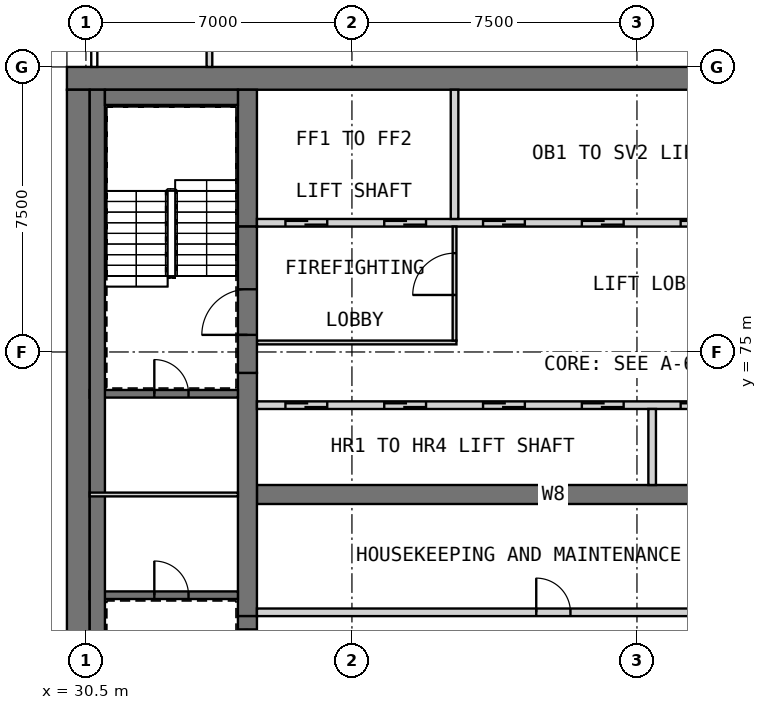
"""IFC4 building model, lengths in metres.
Left out: names, types, materials, properties, quantities, classifications, styles, units other than length and angle.
Written with IfcOpenShell. Run it as: python <this file> out.ifc"""

import sys

from ifc_helpers import new_model, si_unit, direction, frame, frame_2d, origin, place, context, subcontext, project, spatial, rectangle, extrude, element, fill, save


model = new_model("IFC4")
c1 = context("Model", 3, precision=1e-05, world=origin(), true_north=direction((0.0, 1.0)))
c2 = subcontext(c1, "Body", "Model", "MODEL_VIEW")
j1 = project(units=[si_unit("LENGTHUNIT", "METRE"), si_unit("PLANEANGLEUNIT", "RADIAN")], contexts=[c1])
p1 = place(None, origin())
s1 = spatial("IfcSite", under=j1, at=p1, CompositionType="ELEMENT")
p2 = place(p1, origin())
s2 = spatial("IfcBuilding", under=s1, at=p2, CompositionType="ELEMENT")
p3 = place(p2, frame((0.0, 0.0, 302.7)))
s3 = spatial("IfcBuildingStorey", under=s2, at=p3, CompositionType="ELEMENT", Elevation=302.7)
p4 = place(p3, frame((30.0, 82.2, 0.0), z_axis=(0.0, 0.0, 1.0), x_axis=(1.0, 0.0, 0.0)))
e1 = element("IfcWall", 1, at=p4, inside=s3, PredefinedType="SHEAR", context=c2, shape_type="SweptSolid", body=[
    extrude(rectangle(XDim=30.0, YDim=0.6, at=frame_2d((15.0, 0.0))), origin(), (0.0, 0.0, 1.0), 6.0),
])
p5 = place(p3, frame((30.3, 60.6, 0.0), z_axis=(0.0, 0.0, 1.0), x_axis=(0.0, 1.0, 0.0)))
e2 = element("IfcWall", 2, at=p5, inside=s3, PredefinedType="SHEAR", context=c2, shape_type="SweptSolid", body=[
    extrude(rectangle(XDim=21.3, YDim=0.6, at=frame_2d((10.65, 0.0))), origin(), (0.0, 0.0, 1.0), 6.0),
])
p6 = place(p3, frame((35.0, 71.25, 0.0), z_axis=(0.0, 0.0, 1.0), x_axis=(1.0, 0.0, 0.0)))
e3 = element("IfcWall", 3, at=p6, inside=s3, PredefinedType="SHEAR", context=c2, shape_type="SweptSolid", body=[
    extrude(rectangle(XDim=15.6, YDim=0.5, at=frame_2d((7.8, 0.0))), origin(), (0.0, 0.0, 1.0), 6.0),
])
p7 = place(p3, frame((34.75, 68.05, 0.0), z_axis=(0.0, 0.0, 1.0), x_axis=(0.0, 1.0, 0.0)))
e4 = element("IfcWall", 4, at=p7, inside=s3, PredefinedType="SHEAR", context=c2, shape_type="SweptSolid", body=[
    extrude(rectangle(XDim=6.4, YDim=0.5, at=frame_2d((3.2, 0.0))), origin(), (0.0, 0.0, 1.0), 6.0),
])
p8 = place(p3, frame((34.75, 78.3, 0.0), z_axis=(0.0, 0.0, 1.0), x_axis=(0.0, 1.0, 0.0)))
e5 = element("IfcWall", 5, at=p8, inside=s3, PredefinedType="SHEAR", context=c2, shape_type="SweptSolid", body=[
    extrude(rectangle(XDim=3.6, YDim=0.5, at=frame_2d((1.8, 0.0))), origin(), (0.0, 0.0, 1.0), 6.0),
])
p9 = place(p2, frame((0.0, 0.0, 34.0)))
s4 = spatial("IfcBuildingStorey", under=s2, at=p9, CompositionType="ELEMENT", Elevation=34.0)
for number, where, z_axis, x_axis in (
    (6, (29.7, 70.8, 0.0), (0.0, 0.0, 1.0), (0.0, 1.0, 0.0)),
    (7, (29.7, 75.675, 0.0), (0.0, 0.0, 1.0), (0.0, 1.0, 0.0)),
    (8, (29.7, 80.55, 0.0), (0.0, 0.0, 1.0), (0.0, 1.0, 0.0)),
):
    element("IfcWall", number, at=place(p9, frame(where, z_axis=z_axis, x_axis=x_axis)), inside=s4, PredefinedType="SOLIDWALL", context=c2, shape_type="SweptSolid", body=[
        extrude(rectangle(XDim=0.9, YDim=0.6, at=frame_2d((0.45, 0.0))), origin(), (0.0, 0.0, 1.0), 286.2),
    ])
p10 = place(p3, frame((35.0, 68.15, 0.0), z_axis=(0.0, 0.0, 1.0), x_axis=(1.0, 0.0, 0.0)))
e9 = element("IfcWall", 9, at=p10, inside=s3, PredefinedType="PARTITIONING", context=c2, shape_type="SweptSolid", body=[
    extrude(rectangle(XDim=15.6, YDim=0.2, at=frame_2d((7.8, 0.0))), origin(), (0.0, 0.0, 1.0), 5.7),
])
p11 = place(p10, frame((7.35, 0.0, 0.0)))
e10 = element("IfcOpeningElement", 10, at=p11, cuts=e9, PredefinedType="OPENING", context=c2, shape_type="SweptSolid", body=[
    extrude(rectangle(XDim=0.9, YDim=2.1, at=frame_2d((0.45, 1.05))), frame((0.0, 0.11, 0.0), z_axis=(0.0, -1.0, 0.0), x_axis=(1.0, 0.0, 0.0)), (0.0, 0.0, 1.0), 0.22),
])
p12 = place(p3, frame((35.0, 73.6, 0.0), z_axis=(0.0, 0.0, 1.0), x_axis=(1.0, 0.0, 0.0)))
e11 = element("IfcWall", 11, at=p12, inside=s3, PredefinedType="SOLIDWALL", context=c2, shape_type="SweptSolid", body=[
    extrude(rectangle(XDim=15.6, YDim=0.2, at=frame_2d((7.8, 0.0))), origin(), (0.0, 0.0, 1.0), 6.0),
])
p13 = place(p12, frame((0.75, 0.0, 0.0)))
e12 = element("IfcOpeningElement", 12, at=p13, cuts=e11, PredefinedType="OPENING", context=c2, shape_type="SweptSolid", body=[
    extrude(rectangle(XDim=1.1, YDim=2.1, at=frame_2d((0.55, 1.05))), frame((0.0, 0.11, 0.0), z_axis=(0.0, -1.0, 0.0), x_axis=(1.0, 0.0, 0.0)), (0.0, 0.0, 1.0), 0.22),
])
p14 = place(p12, frame((3.35, 0.0, 0.0)))
e13 = element("IfcOpeningElement", 13, at=p14, cuts=e11, PredefinedType="OPENING", context=c2, shape_type="SweptSolid", body=[
    extrude(rectangle(XDim=1.1, YDim=2.1, at=frame_2d((0.55, 1.05))), frame((0.0, 0.11, 0.0), z_axis=(0.0, -1.0, 0.0), x_axis=(1.0, 0.0, 0.0)), (0.0, 0.0, 1.0), 0.22),
])
p15 = place(p12, frame((5.95, 0.0, 0.0)))
e14 = element("IfcOpeningElement", 14, at=p15, cuts=e11, PredefinedType="OPENING", context=c2, shape_type="SweptSolid", body=[
    extrude(rectangle(XDim=1.1, YDim=2.1, at=frame_2d((0.55, 1.05))), frame((0.0, 0.11, 0.0), z_axis=(0.0, -1.0, 0.0), x_axis=(1.0, 0.0, 0.0)), (0.0, 0.0, 1.0), 0.22),
])
p16 = place(p12, frame((8.55, 0.0, 0.0)))
e15 = element("IfcOpeningElement", 15, at=p16, cuts=e11, PredefinedType="OPENING", context=c2, shape_type="SweptSolid", body=[
    extrude(rectangle(XDim=1.1, YDim=2.1, at=frame_2d((0.55, 1.05))), frame((0.0, 0.11, 0.0), z_axis=(0.0, -1.0, 0.0), x_axis=(1.0, 0.0, 0.0)), (0.0, 0.0, 1.0), 0.22),
])
p17 = place(p12, frame((11.15, 0.0, 0.0)))
e16 = element("IfcOpeningElement", 16, at=p17, cuts=e11, PredefinedType="OPENING", context=c2, shape_type="SweptSolid", body=[
    extrude(rectangle(XDim=1.1, YDim=2.1, at=frame_2d((0.55, 1.05))), frame((0.0, 0.11, 0.0), z_axis=(0.0, -1.0, 0.0), x_axis=(1.0, 0.0, 0.0)), (0.0, 0.0, 1.0), 0.22),
])
p18 = place(p12, frame((13.75, 0.0, 0.0)))
e17 = element("IfcOpeningElement", 17, at=p18, cuts=e11, PredefinedType="OPENING", context=c2, shape_type="SweptSolid", body=[
    extrude(rectangle(XDim=1.1, YDim=2.1, at=frame_2d((0.55, 1.05))), frame((0.0, 0.11, 0.0), z_axis=(0.0, -1.0, 0.0), x_axis=(1.0, 0.0, 0.0)), (0.0, 0.0, 1.0), 0.22),
])
p19 = place(p3, frame((45.4, 71.5, 0.0), z_axis=(0.0, 0.0, 1.0), x_axis=(0.0, 1.0, 0.0)))
e18 = element("IfcWall", 18, at=p19, inside=s3, PredefinedType="SOLIDWALL", context=c2, shape_type="SweptSolid", body=[
    extrude(rectangle(XDim=2.0, YDim=0.2, at=frame_2d((1.0, 0.0))), origin(), (0.0, 0.0, 1.0), 6.0),
])
p20 = place(p3, frame((35.0, 78.4, 0.0), z_axis=(0.0, 0.0, 1.0), x_axis=(1.0, 0.0, 0.0)))
e19 = element("IfcWall", 19, at=p20, inside=s3, PredefinedType="SOLIDWALL", context=c2, shape_type="SweptSolid", body=[
    extrude(rectangle(XDim=15.6, YDim=0.2, at=frame_2d((7.8, 0.0))), origin(), (0.0, 0.0, 1.0), 6.0),
])
p21 = place(p20, frame((0.75, 0.0, 0.0)))
e20 = element("IfcOpeningElement", 20, at=p21, cuts=e19, PredefinedType="OPENING", context=c2, shape_type="SweptSolid", body=[
    extrude(rectangle(XDim=1.1, YDim=2.1, at=frame_2d((0.55, 1.05))), frame((0.0, 0.11, 0.0), z_axis=(0.0, -1.0, 0.0), x_axis=(1.0, 0.0, 0.0)), (0.0, 0.0, 1.0), 0.22),
])
p22 = place(p20, frame((3.35, 0.0, 0.0)))
e21 = element("IfcOpeningElement", 21, at=p22, cuts=e19, PredefinedType="OPENING", context=c2, shape_type="SweptSolid", body=[
    extrude(rectangle(XDim=1.1, YDim=2.1, at=frame_2d((0.55, 1.05))), frame((0.0, 0.11, 0.0), z_axis=(0.0, -1.0, 0.0), x_axis=(1.0, 0.0, 0.0)), (0.0, 0.0, 1.0), 0.22),
])
p23 = place(p20, frame((5.95, 0.0, 0.0)))
e22 = element("IfcOpeningElement", 22, at=p23, cuts=e19, PredefinedType="OPENING", context=c2, shape_type="SweptSolid", body=[
    extrude(rectangle(XDim=1.1, YDim=2.1, at=frame_2d((0.55, 1.05))), frame((0.0, 0.11, 0.0), z_axis=(0.0, -1.0, 0.0), x_axis=(1.0, 0.0, 0.0)), (0.0, 0.0, 1.0), 0.22),
])
p24 = place(p20, frame((8.55, 0.0, 0.0)))
e23 = element("IfcOpeningElement", 23, at=p24, cuts=e19, PredefinedType="OPENING", context=c2, shape_type="SweptSolid", body=[
    extrude(rectangle(XDim=1.1, YDim=2.1, at=frame_2d((0.55, 1.05))), frame((0.0, 0.11, 0.0), z_axis=(0.0, -1.0, 0.0), x_axis=(1.0, 0.0, 0.0)), (0.0, 0.0, 1.0), 0.22),
])
p25 = place(p20, frame((11.15, 0.0, 0.0)))
e24 = element("IfcOpeningElement", 24, at=p25, cuts=e19, PredefinedType="OPENING", context=c2, shape_type="SweptSolid", body=[
    extrude(rectangle(XDim=1.1, YDim=2.1, at=frame_2d((0.55, 1.05))), frame((0.0, 0.11, 0.0), z_axis=(0.0, -1.0, 0.0), x_axis=(1.0, 0.0, 0.0)), (0.0, 0.0, 1.0), 0.22),
])
p26 = place(p20, frame((13.75, 0.0, 0.0)))
e25 = element("IfcOpeningElement", 25, at=p26, cuts=e19, PredefinedType="OPENING", context=c2, shape_type="SweptSolid", body=[
    extrude(rectangle(XDim=1.1, YDim=2.1, at=frame_2d((0.55, 1.05))), frame((0.0, 0.11, 0.0), z_axis=(0.0, -1.0, 0.0), x_axis=(1.0, 0.0, 0.0)), (0.0, 0.0, 1.0), 0.22),
])
p27 = place(p3, frame((40.2, 78.5, 0.0), z_axis=(0.0, 0.0, 1.0), x_axis=(0.0, 1.0, 0.0)))
e26 = element("IfcWall", 26, at=p27, inside=s3, PredefinedType="SOLIDWALL", context=c2, shape_type="SweptSolid", body=[
    extrude(rectangle(XDim=3.4, YDim=0.2, at=frame_2d((1.7, 0.0))), origin(), (0.0, 0.0, 1.0), 6.0),
])
p28 = place(p3, frame((35.0, 75.25, 0.0), z_axis=(0.0, 0.0, 1.0), x_axis=(1.0, 0.0, 0.0)))
e27 = element("IfcWall", 27, at=p28, inside=s3, PredefinedType="PARTITIONING", context=c2, shape_type="SweptSolid", body=[
    extrude(rectangle(XDim=5.25, YDim=0.1, at=frame_2d((2.625, 0.0))), origin(), (0.0, 0.0, 1.0), 5.7),
])
p29 = place(p3, frame((40.2, 75.3, 0.0), z_axis=(0.0, 0.0, 1.0), x_axis=(0.0, 1.0, 0.0)))
e28 = element("IfcWall", 28, at=p29, inside=s3, PredefinedType="PARTITIONING", context=c2, shape_type="SweptSolid", body=[
    extrude(rectangle(XDim=3.0, YDim=0.1, at=frame_2d((1.5, 0.0))), origin(), (0.0, 0.0, 1.0), 5.7),
])
p30 = place(p29, frame((1.2, 0.0, 0.0)))
e29 = element("IfcOpeningElement", 29, at=p30, cuts=e28, PredefinedType="OPENING", context=c2, shape_type="SweptSolid", body=[
    extrude(rectangle(XDim=1.1, YDim=2.1, at=frame_2d((0.55, 1.05))), frame((0.0, 0.06, 0.0), z_axis=(0.0, -1.0, 0.0), x_axis=(1.0, 0.0, 0.0)), (0.0, 0.0, 1.0), 0.12),
])
p31 = place(p3, frame((34.75, 64.2, 0.0), z_axis=(0.0, 0.0, 1.0), x_axis=(0.0, 1.0, 0.0)))
e30 = element("IfcWall", 30, at=p31, inside=s3, PredefinedType="SOLIDWALL", context=c2, shape_type="SweptSolid", body=[
    extrude(rectangle(XDim=3.85, YDim=0.5, at=frame_2d((1.925, 0.0))), origin(), (0.0, 0.0, 1.0), 4.8),
])
p32 = place(p31, frame((2.3, 0.0, 0.0)))
e31 = element("IfcOpeningElement", 31, at=p32, cuts=e30, PredefinedType="OPENING", context=c2, shape_type="SweptSolid", body=[
    extrude(rectangle(XDim=1.2, YDim=2.1, at=frame_2d((0.6, 1.05))), frame((0.0, 0.26, 0.0), z_axis=(0.0, -1.0, 0.0), x_axis=(1.0, 0.0, 0.0)), (0.0, 0.0, 1.0), 0.52),
])
p33 = place(p3, frame((34.75, 74.45, 0.0), z_axis=(0.0, 0.0, 1.0), x_axis=(0.0, 1.0, 0.0)))
e32 = element("IfcWall", 32, at=p33, inside=s3, PredefinedType="SOLIDWALL", context=c2, shape_type="SweptSolid", body=[
    extrude(rectangle(XDim=3.85, YDim=0.5, at=frame_2d((1.925, 0.0))), origin(), (0.0, 0.0, 1.0), 4.8),
])
p34 = place(p33, frame((1.0, 0.0, 0.0)))
e33 = element("IfcOpeningElement", 33, at=p34, cuts=e32, PredefinedType="OPENING", context=c2, shape_type="SweptSolid", body=[
    extrude(rectangle(XDim=1.2, YDim=2.1, at=frame_2d((0.6, 1.05))), frame((0.0, 0.26, 0.0), z_axis=(0.0, -1.0, 0.0), x_axis=(1.0, 0.0, 0.0)), (0.0, 0.0, 1.0), 0.52),
])
p35 = place(p3, frame((30.6, 68.6, 0.0), z_axis=(0.0, 0.0, 1.0), x_axis=(1.0, 0.0, 0.0)))
e34 = element("IfcWall", 34, at=p35, inside=s3, PredefinedType="SOLIDWALL", context=c2, shape_type="SweptSolid", body=[
    extrude(rectangle(XDim=3.9, YDim=0.2, at=frame_2d((1.95, 0.0))), origin(), (0.0, 0.0, 1.0), 5.7),
])
p36 = place(p35, frame((1.7, 0.0, 0.0)))
e35 = element("IfcOpeningElement", 35, at=p36, cuts=e34, PredefinedType="OPENING", context=c2, shape_type="SweptSolid", body=[
    extrude(rectangle(XDim=0.9, YDim=2.1, at=frame_2d((0.45, 1.05))), frame((0.0, 0.11, 0.0), z_axis=(0.0, -1.0, 0.0), x_axis=(1.0, 0.0, 0.0)), (0.0, 0.0, 1.0), 0.22),
])
p37 = place(p3, frame((30.6, 73.9, 0.0), z_axis=(0.0, 0.0, 1.0), x_axis=(1.0, 0.0, 0.0)))
e36 = element("IfcWall", 36, at=p37, inside=s3, PredefinedType="SOLIDWALL", context=c2, shape_type="SweptSolid", body=[
    extrude(rectangle(XDim=3.9, YDim=0.2, at=frame_2d((1.95, 0.0))), origin(), (0.0, 0.0, 1.0), 5.7),
])
p38 = place(p37, frame((1.7, 0.0, 0.0)))
e37 = element("IfcOpeningElement", 37, at=p38, cuts=e36, PredefinedType="OPENING", context=c2, shape_type="SweptSolid", body=[
    extrude(rectangle(XDim=0.9, YDim=2.1, at=frame_2d((0.45, 1.05))), frame((0.0, 0.11, 0.0), z_axis=(0.0, -1.0, 0.0), x_axis=(1.0, 0.0, 0.0)), (0.0, 0.0, 1.0), 0.22),
])
p39 = place(p3, frame((30.8, 60.6, 0.0), z_axis=(0.0, 0.0, 1.0), x_axis=(0.0, 1.0, 0.0)))
e38 = element("IfcWall", 38, at=p39, inside=s3, PredefinedType="SOLIDWALL", context=c2, shape_type="SweptSolid", body=[
    extrude(rectangle(XDim=21.3, YDim=0.4, at=frame_2d((10.65, 0.0))), origin(), (0.0, 0.0, 1.0), 5.7),
])
p40 = place(p3, frame((31.0, 81.7, 0.0), z_axis=(0.0, 0.0, 1.0), x_axis=(1.0, 0.0, 0.0)))
e39 = element("IfcWall", 39, at=p40, inside=s3, PredefinedType="SOLIDWALL", context=c2, shape_type="SweptSolid", body=[
    extrude(rectangle(XDim=3.5, YDim=0.4, at=frame_2d((1.75, 0.0))), origin(), (0.0, 0.0, 1.0), 5.7),
])
p41 = place(p3, frame((30.6, 71.25, 0.0), z_axis=(0.0, 0.0, 1.0), x_axis=(1.0, 0.0, 0.0)))
e40 = element("IfcWall", 40, at=p41, inside=s3, PredefinedType="PARTITIONING", context=c2, shape_type="SweptSolid", body=[
    extrude(rectangle(XDim=3.9, YDim=0.1, at=frame_2d((1.95, 0.0))), origin(), (0.0, 0.0, 1.0), 5.7),
])
p42 = place(p3, frame((33.75, 82.5, 0.0), z_axis=(0.0, 0.0, 1.0), x_axis=(0.0, 1.0, 0.0)))
e41 = element("IfcWall", 41, at=p42, inside=s3, PredefinedType="PARTITIONING", context=c2, shape_type="SweptSolid", body=[
    extrude(rectangle(XDim=1.725, YDim=0.15, at=frame_2d((0.863, 0.0))), origin(), (0.0, 0.0, 1.0), 5.7),
])
p43 = place(p11, origin())
e42 = element("IfcDoor", 42, at=p43, inside=s3, OperationType="SINGLE_SWING_LEFT", PredefinedType="DOOR", context=c2, shape_type="SweptSolid", body=[
    extrude(rectangle(XDim=0.9, YDim=2.1, at=frame_2d((0.45, 1.05))), frame((0.0, 0.025, 0.0), z_axis=(0.0, -1.0, 0.0), x_axis=(1.0, 0.0, 0.0)), (0.0, 0.0, 1.0), 0.05),
])
fill(e10, e42)
p44 = place(p13, origin())
e43 = element("IfcDoor", 43, at=p44, inside=s3, OperationType="DOUBLE_DOOR_SLIDING", PredefinedType="DOOR", context=c2, shape_type="SweptSolid", body=[
    extrude(rectangle(XDim=1.1, YDim=2.1, at=frame_2d((0.55, 1.05))), frame((0.0, 0.025, 0.0), z_axis=(0.0, -1.0, 0.0), x_axis=(1.0, 0.0, 0.0)), (0.0, 0.0, 1.0), 0.05),
])
fill(e12, e43)
p45 = place(p14, origin())
e44 = element("IfcDoor", 44, at=p45, inside=s3, OperationType="DOUBLE_DOOR_SLIDING", PredefinedType="DOOR", context=c2, shape_type="SweptSolid", body=[
    extrude(rectangle(XDim=1.1, YDim=2.1, at=frame_2d((0.55, 1.05))), frame((0.0, 0.025, 0.0), z_axis=(0.0, -1.0, 0.0), x_axis=(1.0, 0.0, 0.0)), (0.0, 0.0, 1.0), 0.05),
])
fill(e13, e44)
p46 = place(p15, origin())
e45 = element("IfcDoor", 45, at=p46, inside=s3, OperationType="DOUBLE_DOOR_SLIDING", PredefinedType="DOOR", context=c2, shape_type="SweptSolid", body=[
    extrude(rectangle(XDim=1.1, YDim=2.1, at=frame_2d((0.55, 1.05))), frame((0.0, 0.025, 0.0), z_axis=(0.0, -1.0, 0.0), x_axis=(1.0, 0.0, 0.0)), (0.0, 0.0, 1.0), 0.05),
])
fill(e14, e45)
p47 = place(p16, origin())
e46 = element("IfcDoor", 46, at=p47, inside=s3, OperationType="DOUBLE_DOOR_SLIDING", PredefinedType="DOOR", context=c2, shape_type="SweptSolid", body=[
    extrude(rectangle(XDim=1.1, YDim=2.1, at=frame_2d((0.55, 1.05))), frame((0.0, 0.025, 0.0), z_axis=(0.0, -1.0, 0.0), x_axis=(1.0, 0.0, 0.0)), (0.0, 0.0, 1.0), 0.05),
])
fill(e15, e46)
p48 = place(p17, origin())
e47 = element("IfcDoor", 47, at=p48, inside=s3, OperationType="DOUBLE_DOOR_SLIDING", PredefinedType="DOOR", context=c2, shape_type="SweptSolid", body=[
    extrude(rectangle(XDim=1.1, YDim=2.1, at=frame_2d((0.55, 1.05))), frame((0.0, 0.025, 0.0), z_axis=(0.0, -1.0, 0.0), x_axis=(1.0, 0.0, 0.0)), (0.0, 0.0, 1.0), 0.05),
])
fill(e16, e47)
p49 = place(p21, origin())
e48 = element("IfcDoor", 48, at=p49, inside=s3, OperationType="DOUBLE_DOOR_SLIDING", PredefinedType="DOOR", context=c2, shape_type="SweptSolid", body=[
    extrude(rectangle(XDim=1.1, YDim=2.1, at=frame_2d((0.55, 1.05))), frame((0.0, 0.025, 0.0), z_axis=(0.0, -1.0, 0.0), x_axis=(1.0, 0.0, 0.0)), (0.0, 0.0, 1.0), 0.05),
])
fill(e20, e48)
p50 = place(p22, origin())
e49 = element("IfcDoor", 49, at=p50, inside=s3, OperationType="DOUBLE_DOOR_SLIDING", PredefinedType="DOOR", context=c2, shape_type="SweptSolid", body=[
    extrude(rectangle(XDim=1.1, YDim=2.1, at=frame_2d((0.55, 1.05))), frame((0.0, 0.025, 0.0), z_axis=(0.0, -1.0, 0.0), x_axis=(1.0, 0.0, 0.0)), (0.0, 0.0, 1.0), 0.05),
])
fill(e21, e49)
p51 = place(p23, origin())
e50 = element("IfcDoor", 50, at=p51, inside=s3, OperationType="DOUBLE_DOOR_SLIDING", PredefinedType="DOOR", context=c2, shape_type="SweptSolid", body=[
    extrude(rectangle(XDim=1.1, YDim=2.1, at=frame_2d((0.55, 1.05))), frame((0.0, 0.025, 0.0), z_axis=(0.0, -1.0, 0.0), x_axis=(1.0, 0.0, 0.0)), (0.0, 0.0, 1.0), 0.05),
])
fill(e22, e50)
p52 = place(p24, origin())
e51 = element("IfcDoor", 51, at=p52, inside=s3, OperationType="DOUBLE_DOOR_SLIDING", PredefinedType="DOOR", context=c2, shape_type="SweptSolid", body=[
    extrude(rectangle(XDim=1.1, YDim=2.1, at=frame_2d((0.55, 1.05))), frame((0.0, 0.025, 0.0), z_axis=(0.0, -1.0, 0.0), x_axis=(1.0, 0.0, 0.0)), (0.0, 0.0, 1.0), 0.05),
])
fill(e23, e51)
p53 = place(p25, origin())
e52 = element("IfcDoor", 52, at=p53, inside=s3, OperationType="DOUBLE_DOOR_SLIDING", PredefinedType="DOOR", context=c2, shape_type="SweptSolid", body=[
    extrude(rectangle(XDim=1.1, YDim=2.1, at=frame_2d((0.55, 1.05))), frame((0.0, 0.025, 0.0), z_axis=(0.0, -1.0, 0.0), x_axis=(1.0, 0.0, 0.0)), (0.0, 0.0, 1.0), 0.05),
])
fill(e24, e52)
p54 = place(p30, origin())
e53 = element("IfcDoor", 53, at=p54, inside=s3, OperationType="SINGLE_SWING_LEFT", PredefinedType="DOOR", context=c2, shape_type="SweptSolid", body=[
    extrude(rectangle(XDim=1.1, YDim=2.1, at=frame_2d((0.55, 1.05))), frame((0.0, 0.025, 0.0), z_axis=(0.0, -1.0, 0.0), x_axis=(1.0, 0.0, 0.0)), (0.0, 0.0, 1.0), 0.05),
])
fill(e29, e53)
p55 = place(p32, origin())
e54 = element("IfcDoor", 54, at=p55, inside=s3, OperationType="SINGLE_SWING_LEFT", PredefinedType="DOOR", context=c2, shape_type="SweptSolid", body=[
    extrude(rectangle(XDim=1.2, YDim=2.1, at=frame_2d((0.6, 1.05))), frame((0.0, 0.025, 0.0), z_axis=(0.0, -1.0, 0.0), x_axis=(1.0, 0.0, 0.0)), (0.0, 0.0, 1.0), 0.05),
])
fill(e31, e54)
p56 = place(p34, origin())
e55 = element("IfcDoor", 55, at=p56, inside=s3, OperationType="SINGLE_SWING_RIGHT", PredefinedType="DOOR", context=c2, shape_type="SweptSolid", body=[
    extrude(rectangle(XDim=1.2, YDim=2.1, at=frame_2d((0.6, 1.05))), frame((0.0, 0.025, 0.0), z_axis=(0.0, -1.0, 0.0), x_axis=(1.0, 0.0, 0.0)), (0.0, 0.0, 1.0), 0.05),
])
fill(e33, e55)
p57 = place(p36, origin())
e56 = element("IfcDoor", 56, at=p57, inside=s3, OperationType="SINGLE_SWING_LEFT", PredefinedType="DOOR", context=c2, shape_type="SweptSolid", body=[
    extrude(rectangle(XDim=0.9, YDim=2.1, at=frame_2d((0.45, 1.05))), frame((0.0, 0.025, 0.0), z_axis=(0.0, -1.0, 0.0), x_axis=(1.0, 0.0, 0.0)), (0.0, 0.0, 1.0), 0.05),
])
fill(e35, e56)
p58 = place(p38, origin())
e57 = element("IfcDoor", 57, at=p58, inside=s3, OperationType="SINGLE_SWING_RIGHT", PredefinedType="DOOR", context=c2, shape_type="SweptSolid", body=[
    extrude(rectangle(XDim=0.9, YDim=2.1, at=frame_2d((0.45, 1.05))), frame((0.0, 0.025, 0.0), z_axis=(0.0, -1.0, 0.0), x_axis=(1.0, 0.0, 0.0)), (0.0, 0.0, 1.0), 0.05),
])
fill(e37, e57)
save(model, sys.argv[1])
